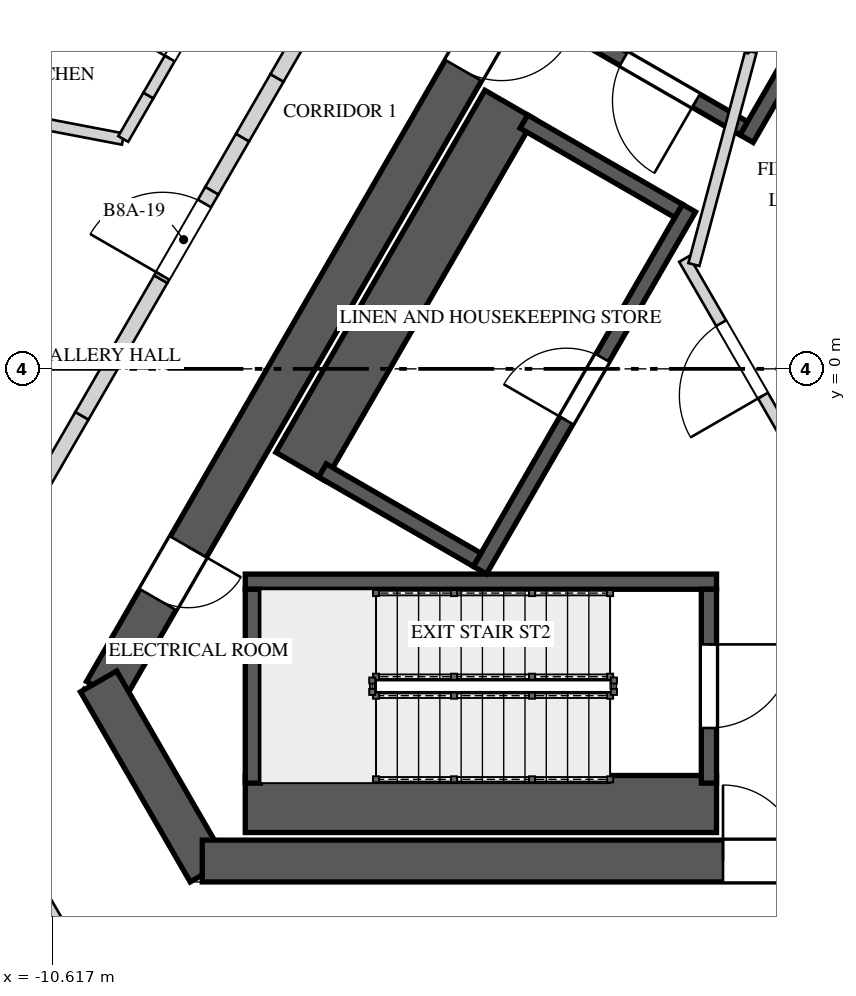
"""IFC4 building model, lengths in metres.
Left out: names, types, materials, properties, quantities, classifications, styles, units other than length and angle.
Written with IfcOpenShell. Run it as: python <this file> out.ifc"""

import sys

from ifc_helpers import new_model, si_unit, direction, frame, frame_2d, origin, place, context, subcontext, project, spatial, polyline, rectangle, outline, extrude, element, fill, save


model = new_model("IFC4")
c1 = context("Model", 3, precision=1e-05, world=origin(), true_north=direction((0.0, 1.0)))
c2 = subcontext(c1, "Body", "Model", "MODEL_VIEW")
j1 = project(units=[si_unit("LENGTHUNIT", "METRE"), si_unit("PLANEANGLEUNIT", "RADIAN")], contexts=[c1])
p1 = place(None, origin())
s1 = spatial("IfcSite", under=j1, at=p1, CompositionType="ELEMENT")
p2 = place(p1, origin())
s2 = spatial("IfcBuilding", under=s1, at=p2, CompositionType="ELEMENT")
p3 = place(p2, frame((0.0, 0.0, 320.4)))
s3 = spatial("IfcBuildingStorey", under=s2, at=p3, CompositionType="ELEMENT", Elevation=320.4)
p4 = place(p3, frame((-1.285, 10.725, 0.0), z_axis=(0.0, 0.0, 1.0), x_axis=(-0.499994590896, -0.86602852671, 0.0)))
e1 = element("IfcWall", 1, at=p4, inside=s3, PredefinedType="SHEAR", context=c2, shape_type="SweptSolid", body=[
    extrude(rectangle(XDim=17.292, YDim=0.55, at=frame_2d((8.646, 0.0))), origin(), (0.0, 0.0, 1.0), 4.0),
])
p5 = place(p4, frame((6.851, 0.0, 0.0)))
e2 = element("IfcOpeningElement", 2, at=p5, cuts=e1, PredefinedType="OPENING", context=c2, shape_type="SweptSolid", body=[
    extrude(rectangle(XDim=1.0, YDim=2.4, at=frame_2d((0.5, 1.2))), frame((0.0, 0.285, 0.0), z_axis=(0.0, -1.0, 0.0), x_axis=(1.0, 0.0, 0.0)), (0.0, 0.0, 1.0), 0.57),
])
p6 = place(p4, frame((15.089, 0.0, 0.0)))
e3 = element("IfcOpeningElement", 3, at=p6, cuts=e1, PredefinedType="OPENING", context=c2, shape_type="SweptSolid", body=[
    extrude(rectangle(XDim=0.8, YDim=2.1, at=frame_2d((0.4, 1.05))), frame((0.0, 0.285, 0.0), z_axis=(0.0, -1.0, 0.0), x_axis=(1.0, 0.0, 0.0)), (0.0, 0.0, 1.0), 0.57),
])
p7 = place(p3, frame((-10.01, -4.113, 0.0), z_axis=(0.0, 0.0, 1.0), x_axis=(0.499995765644, -0.866027848477, 0.0)))
e4 = element("IfcWall", 4, at=p7, inside=s3, PredefinedType="SHEAR", context=c2, shape_type="SweptSolid", body=[
    extrude(rectangle(XDim=2.887, YDim=0.55, at=frame_2d((1.443, 0.0))), origin(), (0.0, 0.0, 1.0), 4.0),
])
p8 = place(p3, frame((-8.646, -6.475, 0.0), z_axis=(0.0, 0.0, 1.0), x_axis=(1.0, 0.0, 0.0)))
e5 = element("IfcWall", 5, at=p8, inside=s3, PredefinedType="SHEAR", context=c2, shape_type="SweptSolid", body=[
    extrude(rectangle(XDim=17.292, YDim=0.55, at=frame_2d((8.646, 0.0))), origin(), (0.0, 0.0, 1.0), 4.0),
])
p9 = place(p8, frame((6.851, 0.0, 0.0)))
e6 = element("IfcOpeningElement", 6, at=p9, cuts=e5, PredefinedType="OPENING", context=c2, shape_type="SweptSolid", body=[
    extrude(rectangle(XDim=1.0, YDim=2.4, at=frame_2d((0.5, 1.2))), frame((0.0, 0.285, 0.0), z_axis=(0.0, -1.0, 0.0), x_axis=(1.0, 0.0, 0.0)), (0.0, 0.0, 1.0), 0.57),
])
p10 = place(p3, frame((-13.093, -6.868, 0.0), z_axis=(0.0, 0.0, 1.0), x_axis=(0.669136224502, -0.74313976684, 0.0)))
e7 = element("IfcWall", 7, at=p10, inside=s3, PredefinedType="SOLIDWALL", context=c2, shape_type="SweptSolid", body=[
    extrude(rectangle(XDim=7.314, YDim=0.45, at=frame_2d((3.657, 0.0))), origin(), (0.0, 0.0, 1.0), 3.3),
])
p11 = place(p10, frame((0.161, 0.0, 0.4)))
e8 = element("IfcOpeningElement", 8, at=p11, cuts=e7, PredefinedType="OPENING", context=c2, shape_type="SweptSolid", body=[
    extrude(rectangle(XDim=1.95, YDim=2.75, at=frame_2d((0.975, 1.375))), frame((0.0, 0.235, 0.0), z_axis=(0.0, -1.0, 0.0), x_axis=(1.0, 0.0, 0.0)), (0.0, 0.0, 1.0), 0.47),
])
p12 = place(p10, frame((2.682, 0.0, 0.4)))
e9 = element("IfcOpeningElement", 9, at=p12, cuts=e7, PredefinedType="OPENING", context=c2, shape_type="SweptSolid", body=[
    extrude(rectangle(XDim=1.95, YDim=2.75, at=frame_2d((0.975, 1.375))), frame((0.0, 0.235, 0.0), z_axis=(0.0, -1.0, 0.0), x_axis=(1.0, 0.0, 0.0)), (0.0, 0.0, 1.0), 0.47),
])
p13 = place(p10, frame((5.203, 0.0, 0.4)))
e10 = element("IfcOpeningElement", 10, at=p13, cuts=e7, PredefinedType="OPENING", context=c2, shape_type="SweptSolid", body=[
    extrude(rectangle(XDim=1.95, YDim=2.75, at=frame_2d((0.975, 1.375))), frame((0.0, 0.235, 0.0), z_axis=(0.0, -1.0, 0.0), x_axis=(1.0, 0.0, 0.0)), (0.0, 0.0, 1.0), 0.47),
])
p14 = place(p3, frame((1.615, 8.397, 0.0), z_axis=(0.0, 0.0, 1.0), x_axis=(-0.500009909098, -0.866019682689, 0.0)))
e11 = element("IfcWall", 11, at=p14, inside=s3, PredefinedType="SOLIDWALL", context=c2, shape_type="SweptSolid", body=[
    extrude(rectangle(XDim=6.2, YDim=0.2, at=frame_2d((3.1, 0.0))), origin(), (0.0, 0.0, 1.0), 3.65),
])
p15 = place(p3, frame((-1.521, 3.165, 0.0), z_axis=(0.0, 0.0, 1.0), x_axis=(-0.866030925526, 0.499990435942, 0.0)))
e12 = element("IfcWall", 12, at=p15, inside=s3, PredefinedType="SOLIDWALL", context=c2, shape_type="SweptSolid", body=[
    extrude(rectangle(XDim=2.55, YDim=0.2, at=frame_2d((1.275, 0.0))), origin(), (0.0, 0.0, 1.0), 3.65),
])
p16 = place(p15, frame((0.725, 0.0, 0.0)))
e13 = element("IfcOpeningElement", 13, at=p16, cuts=e12, PredefinedType="OPENING", context=c2, shape_type="SweptSolid", body=[
    extrude(rectangle(XDim=1.1, YDim=2.4, at=frame_2d((0.55, 1.2))), frame((0.0, 0.11, 0.0), z_axis=(0.0, -1.0, 0.0), x_axis=(1.0, 0.0, 0.0)), (0.0, 0.0, 1.0), 0.22),
])
p17 = place(p3, frame((-8.08, -5.725, 0.0), z_axis=(0.0, 0.0, 1.0), x_axis=(1.0, 0.0, 0.0)))
e14 = element("IfcWall", 14, at=p17, inside=s3, PredefinedType="SOLIDWALL", context=c2, shape_type="SweptSolid", body=[
    extrude(rectangle(XDim=6.2, YDim=0.75, at=frame_2d((3.1, 0.0))), origin(), (0.0, 0.0, 1.0), 3.65),
])
p18 = place(p3, frame((-8.08, -2.8, 0.0), z_axis=(0.0, 0.0, 1.0), x_axis=(1.0, 0.0, 0.0)))
e15 = element("IfcWall", 15, at=p18, inside=s3, PredefinedType="SOLIDWALL", context=c2, shape_type="SweptSolid", body=[
    extrude(rectangle(XDim=6.2, YDim=0.2, at=frame_2d((3.1, 0.0))), origin(), (0.0, 0.0, 1.0), 3.65),
])
p19 = place(p3, frame((-7.98, -2.9, 0.0), z_axis=(0.0, 0.0, 1.0), x_axis=(0.0, -1.0, 0.0)))
e16 = element("IfcWall", 16, at=p19, inside=s3, PredefinedType="SOLIDWALL", context=c2, shape_type="SweptSolid", body=[
    extrude(rectangle(XDim=2.55, YDim=0.2, at=frame_2d((1.275, 0.0))), origin(), (0.0, 0.0, 1.0), 3.65),
])
p20 = place(p3, frame((-1.98, -2.9, 0.0), z_axis=(0.0, 0.0, 1.0), x_axis=(0.0, -1.0, 0.0)))
e17 = element("IfcWall", 17, at=p20, inside=s3, PredefinedType="SOLIDWALL", context=c2, shape_type="SweptSolid", body=[
    extrude(rectangle(XDim=2.55, YDim=0.2, at=frame_2d((1.275, 0.0))), origin(), (0.0, 0.0, 1.0), 3.65),
])
p21 = place(p20, frame((0.725, 0.0, 0.0)))
e18 = element("IfcOpeningElement", 18, at=p21, cuts=e17, PredefinedType="OPENING", context=c2, shape_type="SweptSolid", body=[
    extrude(rectangle(XDim=1.1, YDim=2.4, at=frame_2d((0.55, 1.2))), frame((0.0, 0.11, 0.0), z_axis=(0.0, -1.0, 0.0), x_axis=(1.0, 0.0, 0.0)), (0.0, 0.0, 1.0), 0.22),
])
p22 = place(p3, frame((-4.993, -2.648, 0.0), z_axis=(0.0, 0.0, 1.0), x_axis=(0.499996545922, 0.866027397988, 0.0)))
e19 = element("IfcWall", 19, at=p22, inside=s3, PredefinedType="SOLIDWALL", context=c2, shape_type="SweptSolid", body=[
    extrude(rectangle(XDim=5.5, YDim=0.2, at=frame_2d((2.75, 0.0))), origin(), (0.0, 0.0, 1.0), 3.65),
])
p23 = place(p22, frame((2.275, 0.0, 0.0)))
e20 = element("IfcOpeningElement", 20, at=p23, cuts=e19, PredefinedType="OPENING", context=c2, shape_type="SweptSolid", body=[
    extrude(rectangle(XDim=0.95, YDim=2.4, at=frame_2d((0.475, 1.2))), frame((0.0, 0.11, 0.0), z_axis=(0.0, -1.0, 0.0), x_axis=(1.0, 0.0, 0.0)), (0.0, 0.0, 1.0), 0.22),
])
p24 = place(p3, frame((-4.603, 3.477, 0.0), z_axis=(0.0, 0.0, 1.0), x_axis=(-0.500015767406, -0.866016300277, 0.0)))
e21 = element("IfcWall", 21, at=p24, inside=s3, PredefinedType="SOLIDWALL", context=c2, shape_type="SweptSolid", body=[
    extrude(rectangle(XDim=5.5, YDim=0.75, at=frame_2d((2.75, 0.0))), origin(), (0.0, 0.0, 1.0), 3.65),
])
p25 = place(p3, frame((-2.38, 2.078, 0.0), z_axis=(0.0, 0.0, 1.0), x_axis=(-0.866061024631, 0.499938297808, 0.0)))
e22 = element("IfcWall", 22, at=p25, inside=s3, PredefinedType="SOLIDWALL", context=c2, shape_type="SweptSolid", body=[
    extrude(rectangle(XDim=2.35, YDim=0.2, at=frame_2d((1.175, 0.0))), origin(), (0.0, 0.0, 1.0), 3.65),
])
p26 = place(p3, frame((-5.03, -2.512, 0.0), z_axis=(0.0, 0.0, 1.0), x_axis=(-0.866016039709, 0.500016218704, 0.0)))
e23 = element("IfcWall", 23, at=p26, inside=s3, PredefinedType="SOLIDWALL", context=c2, shape_type="SweptSolid", body=[
    extrude(rectangle(XDim=2.35, YDim=0.2, at=frame_2d((1.175, 0.0))), origin(), (0.0, 0.0, 1.0), 3.65),
])
p27 = place(p3, frame((-0.744, -1.261, 0.0), z_axis=(0.0, 0.0, 1.0), x_axis=(-0.500004234368, 0.866022959057, 0.0)))
e24 = element("IfcWall", 24, at=p27, inside=s3, PredefinedType="PARTITIONING", context=c2, shape_type="SweptSolid", body=[
    extrude(rectangle(XDim=3.125, YDim=0.15, at=frame_2d((1.562, 0.0))), origin(), (0.0, 0.0, 1.0), 3.65),
])
p28 = place(p27, frame((1.05, 0.0, 0.0)))
e25 = element("IfcOpeningElement", 25, at=p28, cuts=e24, PredefinedType="OPENING", context=c2, shape_type="SweptSolid", body=[
    extrude(rectangle(XDim=1.1, YDim=2.4, at=frame_2d((0.55, 1.2))), frame((0.0, 0.085, 0.0), z_axis=(0.0, -1.0, 0.0), x_axis=(1.0, 0.0, 0.0)), (0.0, 0.0, 1.0), 0.17),
])
p29 = place(p3, frame((-2.178, 1.372, 0.0), z_axis=(0.0, 0.0, 1.0), x_axis=(0.258808958833, 0.96592852884, 0.0)))
e26 = element("IfcWall", 26, at=p29, inside=s3, PredefinedType="PARTITIONING", context=c2, shape_type="SweptSolid", body=[
    extrude(rectangle(XDim=2.903, YDim=0.15, at=frame_2d((1.451, 0.0))), origin(), (0.0, 0.0, 1.0), 3.65),
])
p30 = place(p3, frame((-1.51, 4.215, 0.0), z_axis=(0.0, 0.0, 1.0), x_axis=(0.866085525409, 0.49989585183, 0.0)))
e27 = element("IfcWall", 27, at=p30, inside=s3, PredefinedType="PARTITIONING", context=c2, shape_type="SweptSolid", body=[
    extrude(rectangle(XDim=1.3, YDim=0.15, at=frame_2d((0.65, 0.0))), origin(), (0.0, 0.0, 1.0), 3.65),
])
p31 = place(p3, frame((-12.624, 3.584, 0.0), z_axis=(0.0, 0.0, 1.0), x_axis=(0.982222548554, -0.187720177693, 0.0)))
e28 = element("IfcWall", 28, at=p31, inside=s3, PredefinedType="PARTITIONING", context=c2, shape_type="SweptSolid", body=[
    extrude(rectangle(XDim=2.989, YDim=0.15, at=frame_2d((1.494, 0.0))), origin(), (0.0, 0.0, 1.0), 3.65),
])
p32 = place(p3, frame((-9.686, 3.024, 0.0), z_axis=(0.0, 0.0, 1.0), x_axis=(0.500191429871, 0.865914853484, 0.0)))
e29 = element("IfcWall", 29, at=p32, inside=s3, PredefinedType="PARTITIONING", context=c2, shape_type="SweptSolid", body=[
    extrude(rectangle(XDim=0.661, YDim=0.15, at=frame_2d((0.331, 0.0))), origin(), (0.0, 0.0, 1.0), 3.65),
])
p33 = place(p3, frame((-9.355, 3.597, 0.0), z_axis=(0.0, 0.0, 1.0), x_axis=(0.499988530825, 0.866032025414, 0.0)))
e30 = element("IfcWall", 30, at=p33, inside=s3, PredefinedType="PARTITIONING", context=c2, shape_type="SweptSolid", body=[
    extrude(outline(polyline([(0.0, 0.0), (1.562, 0.0), (1.562, 3.65), (0.881, 3.65), (0.881, 2.55), (0.0, 2.55), (0.0, 0.0)])), frame((0.0, 0.075, 0.0), z_axis=(0.0, -1.0, 0.0), x_axis=(1.0, 0.0, 0.0)), (0.0, 0.0, 1.0), 0.15),
])
p34 = place(p33, frame((0.562, 0.0, 0.0)))
e31 = element("IfcOpeningElement", 31, at=p34, cuts=e30, PredefinedType="OPENING", context=c2, shape_type="SweptSolid", body=[
    extrude(rectangle(XDim=0.95, YDim=2.4, at=frame_2d((0.475, 1.2))), frame((0.0, 0.085, 0.0), z_axis=(0.0, -1.0, 0.0), x_axis=(1.0, 0.0, 0.0)), (0.0, 0.0, 1.0), 0.17),
])
p35 = place(p3, frame((-9.844, -8.55, 0.0), z_axis=(0.0, 0.0, 1.0), x_axis=(-0.500003959331, 0.866023117852, 0.0)))
e32 = element("IfcWall", 32, at=p35, inside=s3, PredefinedType="SOLIDWALL", context=c2, shape_type="SweptSolid", body=[
    extrude(rectangle(XDim=3.003, YDim=0.2, at=frame_2d((1.501, 0.0))), origin(), (0.0, 0.0, 1.0), 3.65),
])
p36 = place(p3, frame((-12.326, -4.25, 0.0), z_axis=(0.0, 0.0, 1.0), x_axis=(0.499982771656, 0.866035350345, 0.0)))
e33 = element("IfcWall", 33, at=p36, inside=s3, PredefinedType="SOLIDWALL", context=c2, shape_type="SweptSolid", body=[
    extrude(rectangle(XDim=4.195, YDim=0.2, at=frame_2d((2.097, 0.0))), origin(), (0.0, 0.0, 1.0), 3.65),
])
p37 = place(p3, frame((-10.229, -0.617, 0.0), z_axis=(0.0, 0.0, 1.0), x_axis=(0.5001686003, 0.865928040471, 0.0)))
e34 = element("IfcWall", 34, at=p37, inside=s3, PredefinedType="SOLIDWALL", context=c2, shape_type="SweptSolid", body=[
    extrude(rectangle(XDim=0.821, YDim=0.2, at=frame_2d((0.411, 0.0))), origin(), (0.0, 0.0, 1.0), 2.95),
])
p38 = place(p3, frame((-9.819, 0.094, 0.0), z_axis=(0.0, 0.0, 1.0), x_axis=(0.499969537666, 0.866042990507, 0.0)))
e35 = element("IfcWall", 35, at=p38, inside=s3, PredefinedType="SOLIDWALL", context=c2, shape_type="SweptSolid", body=[
    extrude(rectangle(XDim=1.254, YDim=0.2, at=frame_2d((0.627, 0.0))), origin(), (0.0, 0.0, 1.0), 3.65),
])
p39 = place(p3, frame((-9.191, 1.18, 0.0), z_axis=(0.0, 0.0, 1.0), x_axis=(0.500005339912, 0.866022320763, 0.0)))
e36 = element("IfcWall", 36, at=p39, inside=s3, PredefinedType="SOLIDWALL", context=c2, shape_type="SweptSolid", body=[
    extrude(outline(polyline([(0.0, 0.0), (1.345, 0.0), (1.345, 2.55), (0.401, 2.55), (0.401, 3.65), (0.0, 3.65), (0.0, 0.0)])), frame((0.0, 0.1, 0.0), z_axis=(0.0, -1.0, 0.0), x_axis=(1.0, 0.0, 0.0)), (0.0, 0.0, 1.0), 0.2),
])
p40 = place(p39, frame((0.05, 0.0, 0.0)))
e37 = element("IfcOpeningElement", 37, at=p40, cuts=e36, PredefinedType="OPENING", context=c2, shape_type="SweptSolid", body=[
    extrude(rectangle(XDim=1.1, YDim=2.4, at=frame_2d((0.55, 1.2))), frame((0.0, 0.11, 0.0), z_axis=(0.0, -1.0, 0.0), x_axis=(1.0, 0.0, 0.0)), (0.0, 0.0, 1.0), 0.22),
])
p41 = place(p3, frame((-8.519, 2.344, 0.0), z_axis=(0.0, 0.0, 1.0), x_axis=(0.499914554297, 0.866074730264, 0.0)))
e38 = element("IfcWall", 38, at=p41, inside=s3, PredefinedType="SOLIDWALL", context=c2, shape_type="SweptSolid", body=[
    extrude(rectangle(XDim=0.807, YDim=0.2, at=frame_2d((0.403, 0.0))), origin(), (0.0, 0.0, 1.0), 3.65),
])
p42 = place(p3, frame((-8.116, 3.043, 0.0), z_axis=(0.0, 0.0, 1.0), x_axis=(0.499994660107, 0.866028486751, 0.0)))
e39 = element("IfcWall", 39, at=p42, inside=s3, PredefinedType="SOLIDWALL", context=c2, shape_type="SweptSolid", body=[
    extrude(rectangle(XDim=0.906, YDim=0.2, at=frame_2d((0.453, 0.0))), origin(), (0.0, 0.0, 1.0), 2.55),
])
p43 = place(p3, frame((-7.663, 3.828, 0.0), z_axis=(0.0, 0.0, 1.0), x_axis=(0.499955681623, 0.866050989499, 0.0)))
e40 = element("IfcWall", 40, at=p43, inside=s3, PredefinedType="SOLIDWALL", context=c2, shape_type="SweptSolid", body=[
    extrude(rectangle(XDim=1.238, YDim=0.2, at=frame_2d((0.619, 0.0))), origin(), (0.0, 0.0, 1.0), 3.65),
])
p44 = place(p16, origin())
e41 = element("IfcDoor", 41, at=p44, inside=s3, OperationType="SINGLE_SWING_RIGHT", PredefinedType="DOOR", context=c2, shape_type="SweptSolid", body=[
    extrude(rectangle(XDim=1.1, YDim=2.4, at=frame_2d((0.55, 1.2))), frame((0.0, 0.025, 0.0), z_axis=(0.0, -1.0, 0.0), x_axis=(1.0, 0.0, 0.0)), (0.0, 0.0, 1.0), 0.05),
])
fill(e13, e41)
p45 = place(p21, origin())
e42 = element("IfcDoor", 42, at=p45, inside=s3, OperationType="SINGLE_SWING_LEFT", PredefinedType="DOOR", context=c2, shape_type="SweptSolid", body=[
    extrude(rectangle(XDim=1.1, YDim=2.4, at=frame_2d((0.55, 1.2))), frame((0.0, 0.025, 0.0), z_axis=(0.0, -1.0, 0.0), x_axis=(1.0, 0.0, 0.0)), (0.0, 0.0, 1.0), 0.05),
])
fill(e18, e42)
p46 = place(p23, origin())
e43 = element("IfcDoor", 43, at=p46, inside=s3, OperationType="SINGLE_SWING_LEFT", PredefinedType="DOOR", context=c2, shape_type="SweptSolid", body=[
    extrude(rectangle(XDim=0.95, YDim=2.4, at=frame_2d((0.475, 1.2))), frame((0.0, 0.025, 0.0), z_axis=(0.0, -1.0, 0.0), x_axis=(1.0, 0.0, 0.0)), (0.0, 0.0, 1.0), 0.05),
])
fill(e20, e43)
p47 = place(p28, origin())
e44 = element("IfcDoor", 44, at=p47, inside=s3, OperationType="SINGLE_SWING_RIGHT", PredefinedType="DOOR", context=c2, shape_type="SweptSolid", body=[
    extrude(rectangle(XDim=1.1, YDim=2.4, at=frame_2d((0.55, 1.2))), frame((0.0, 0.025, 0.0), z_axis=(0.0, -1.0, 0.0), x_axis=(1.0, 0.0, 0.0)), (0.0, 0.0, 1.0), 0.05),
])
fill(e25, e44)
p48 = place(p5, origin())
e45 = element("IfcDoor", 45, at=p48, inside=s3, OperationType="SINGLE_SWING_LEFT", PredefinedType="DOOR", context=c2, shape_type="SweptSolid", body=[
    extrude(rectangle(XDim=1.0, YDim=2.4, at=frame_2d((0.5, 1.2))), frame((0.0, 0.025, 0.0), z_axis=(0.0, -1.0, 0.0), x_axis=(1.0, 0.0, 0.0)), (0.0, 0.0, 1.0), 0.05),
])
fill(e2, e45)
p49 = place(p9, origin())
e46 = element("IfcDoor", 46, at=p49, inside=s3, OperationType="SINGLE_SWING_RIGHT", PredefinedType="DOOR", context=c2, shape_type="SweptSolid", body=[
    extrude(rectangle(XDim=1.0, YDim=2.4, at=frame_2d((0.5, 1.2))), frame((0.0, 0.025, 0.0), z_axis=(0.0, -1.0, 0.0), x_axis=(1.0, 0.0, 0.0)), (0.0, 0.0, 1.0), 0.05),
])
fill(e6, e46)
p50 = place(p6, origin())
e47 = element("IfcDoor", 47, at=p50, inside=s3, OperationType="SINGLE_SWING_RIGHT", PredefinedType="DOOR", context=c2, shape_type="SweptSolid", body=[
    extrude(rectangle(XDim=0.8, YDim=2.1, at=frame_2d((0.4, 1.05))), frame((0.0, 0.025, 0.0), z_axis=(0.0, -1.0, 0.0), x_axis=(1.0, 0.0, 0.0)), (0.0, 0.0, 1.0), 0.05),
])
fill(e3, e47)
p51 = place(p34, origin())
e48 = element("IfcDoor", 48, at=p51, inside=s3, OperationType="SINGLE_SWING_LEFT", PredefinedType="DOOR", context=c2, shape_type="SweptSolid", body=[
    extrude(rectangle(XDim=0.95, YDim=2.4, at=frame_2d((0.475, 1.2))), frame((0.0, 0.025, 0.0), z_axis=(0.0, -1.0, 0.0), x_axis=(1.0, 0.0, 0.0)), (0.0, 0.0, 1.0), 0.05),
])
fill(e31, e48)
p52 = place(p40, origin())
e49 = element("IfcDoor", 49, at=p52, inside=s3, OperationType="SINGLE_SWING_LEFT", PredefinedType="DOOR", context=c2, shape_type="SweptSolid", body=[
    extrude(rectangle(XDim=1.1, YDim=2.4, at=frame_2d((0.55, 1.2))), frame((0.0, 0.025, 0.0), z_axis=(0.0, -1.0, 0.0), x_axis=(1.0, 0.0, 0.0)), (0.0, 0.0, 1.0), 0.05),
])
fill(e37, e49)
save(model, sys.argv[1])
